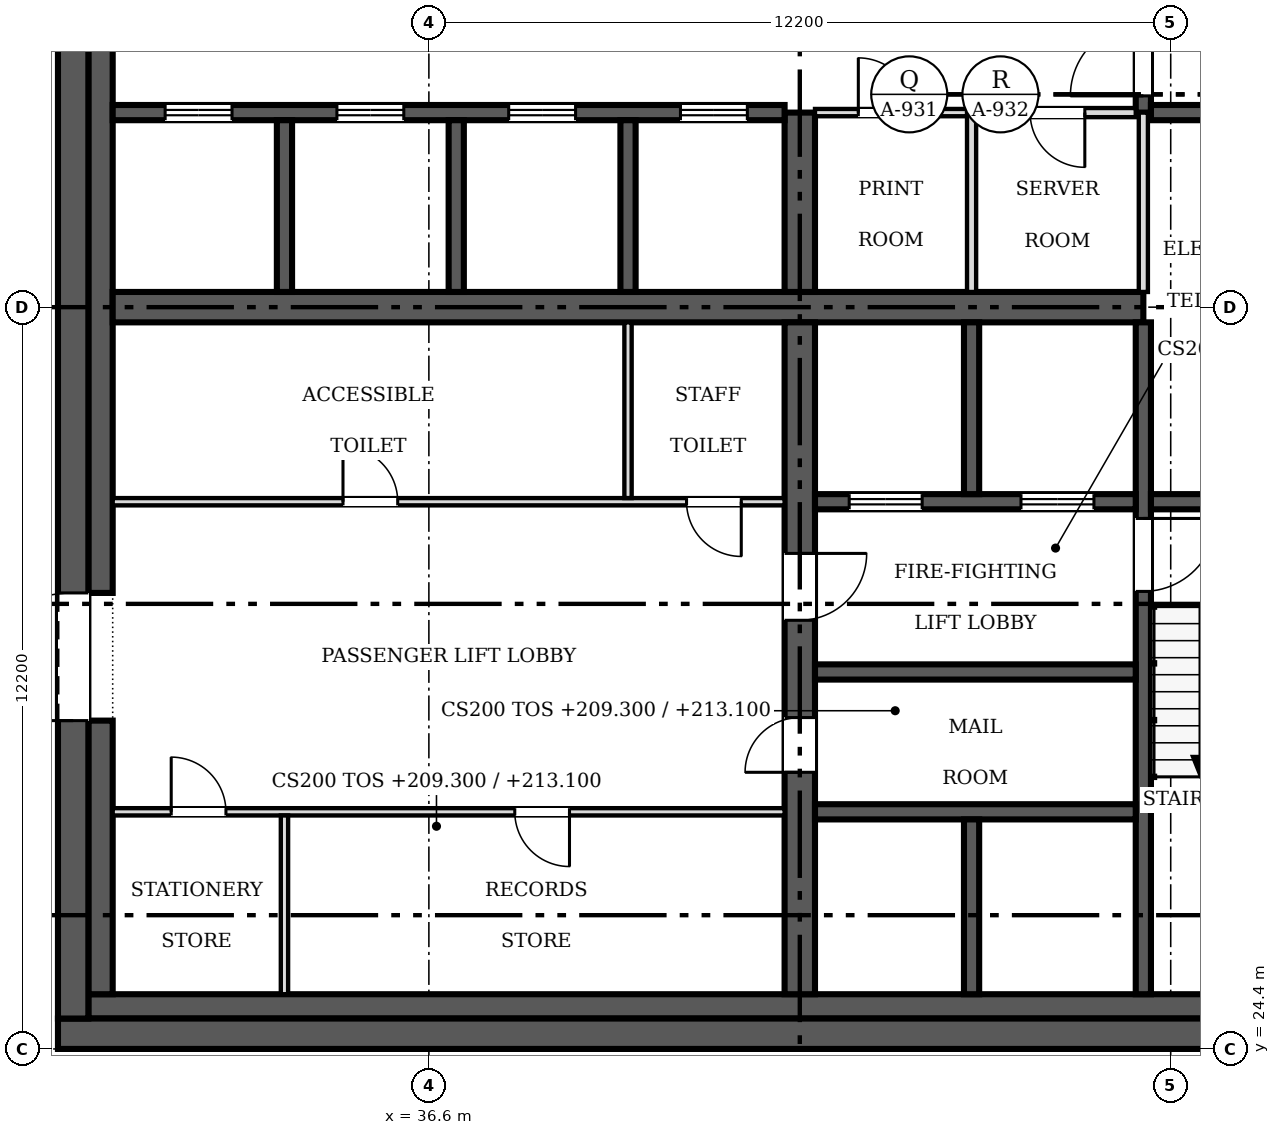
"""IFC4 building model, lengths in metres.
Left out: names, types, materials, properties, quantities, classifications, styles, units other than length and angle.
Written with IfcOpenShell. Run it as: python <this file> out.ifc"""

import sys

from ifc_helpers import new_model, si_unit, direction, frame, frame_2d, origin, place, context, subcontext, project, spatial, rectangle, extrude, source, transform, mapped, element, fill, save


model = new_model("IFC4")
c1 = context("Model", 3, precision=1e-05, world=origin(), true_north=direction((0.0, 1.0)))
c2 = subcontext(c1, "Body", "Model", "MODEL_VIEW")
j1 = project(units=[si_unit("LENGTHUNIT", "METRE"), si_unit("PLANEANGLEUNIT", "RADIAN")], contexts=[c1])
p1 = place(None, origin())
s1 = spatial("IfcSite", under=j1, at=p1, CompositionType="ELEMENT")
p2 = place(p1, origin())
s2 = spatial("IfcBuilding", under=s1, at=p2, CompositionType="ELEMENT")
p3 = place(p2, frame((0.0, 0.0, 209.3)))
s3 = spatial("IfcBuildingStorey", under=s2, at=p3, CompositionType="ELEMENT", Elevation=209.3)
p4 = place(p3, frame((54.9, 24.65, 0.0), z_axis=(0.0, 0.0, 1.0), x_axis=(-1.0, 0.0, 0.0)))
e1 = element("IfcWall", 1, at=p4, inside=s3, PredefinedType="SHEAR", context=c2, shape_type="SweptSolid", body=[
    extrude(rectangle(XDim=24.4, YDim=0.5, at=frame_2d((12.2, 0.0))), origin(), (0.0, 0.0, 1.0), 3.8),
])
m1 = source(origin(), c2, "Body", "SweptSolid", [
    extrude(rectangle(XDim=1.2, YDim=2.1, at=frame_2d((0.6, 1.05))), frame((0.0, 0.26, 0.0), z_axis=(0.0, -1.0, 0.0), x_axis=(1.0, 0.0, 0.0)), (0.0, 0.0, 1.0), 0.52),
])
p5 = place(p4, frame((1.5, 0.0, 0.0)))
e2 = element("IfcOpeningElement", 2, at=p5, cuts=e1, PredefinedType="OPENING", context=c2, shape_type="MappedRepresentation", body=[
    mapped(m1, transform((0.0, 0.0, 0.0), scale=1.0)),
])
p6 = place(p3, frame((30.75, 24.9, 0.0), z_axis=(0.0, 0.0, 1.0), x_axis=(0.0, 1.0, 0.0)))
e3 = element("IfcWall", 3, at=p6, inside=s3, PredefinedType="SHEAR", context=c2, shape_type="SweptSolid", body=[
    extrude(rectangle(XDim=23.4, YDim=0.5, at=frame_2d((11.7, 0.0))), origin(), (0.0, 0.0, 1.0), 3.8),
])
m2 = source(origin(), c2, "Body", "SweptSolid", [
    extrude(rectangle(XDim=2.1, YDim=2.4, at=frame_2d((1.05, 1.2))), frame((0.0, 0.26, 0.0), z_axis=(0.0, -1.0, 0.0), x_axis=(1.0, 0.0, 0.0)), (0.0, 0.0, 1.0), 0.52),
])
p7 = place(p6, frame((4.9, 0.0, 0.0)))
e4 = element("IfcOpeningElement", 4, at=p7, cuts=e3, PredefinedType="OPENING", context=c2, shape_type="MappedRepresentation", body=[
    mapped(m2, transform((0.0, 0.0, 0.0), scale=1.0)),
])
p8 = place(p6, frame((16.4, 0.0, 0.0)))
e5 = element("IfcOpeningElement", 5, at=p8, cuts=e3, PredefinedType="OPENING", context=c2, shape_type="MappedRepresentation", body=[
    mapped(m2, transform((0.0, 0.0, 0.0), scale=1.0)),
])
p9 = place(p3, frame((31.0, 25.1, 0.0), z_axis=(0.0, 0.0, 1.0), x_axis=(1.0, 0.0, 0.0)))
e6 = element("IfcWall", 6, at=p9, inside=s3, PredefinedType="SOLIDWALL", context=c2, shape_type="SweptSolid", body=[
    extrude(rectangle(XDim=21.2, YDim=0.4, at=frame_2d((10.6, 0.0))), origin(), (0.0, 0.0, 1.0), 3.8),
])
p10 = place(p3, frame((31.2, 25.3, 0.0), z_axis=(0.0, 0.0, 1.0), x_axis=(0.0, 1.0, 0.0)))
e7 = element("IfcWall", 7, at=p10, inside=s3, PredefinedType="SOLIDWALL", context=c2, shape_type="SweptSolid", body=[
    extrude(rectangle(XDim=4.5, YDim=0.4, at=frame_2d((2.25, 0.0))), origin(), (0.0, 0.0, 1.0), 3.8),
])
p11 = place(p3, frame((31.2, 31.9, 0.0), z_axis=(0.0, 0.0, 1.0), x_axis=(0.0, 1.0, 0.0)))
e8 = element("IfcWall", 8, at=p11, inside=s3, PredefinedType="SOLIDWALL", context=c2, shape_type="SweptSolid", body=[
    extrude(rectangle(XDim=9.4, YDim=0.4, at=frame_2d((4.7, 0.0))), origin(), (0.0, 0.0, 1.0), 3.8),
])
p12 = place(p3, frame((31.4, 36.6, 0.0), z_axis=(0.0, 0.0, 1.0), x_axis=(1.0, 0.0, 0.0)))
e9 = element("IfcWall", 9, at=p12, inside=s3, PredefinedType="SHEAR", context=c2, shape_type="SweptSolid", body=[
    extrude(rectangle(XDim=16.95, YDim=0.5, at=frame_2d((8.475, 0.0))), origin(), (0.0, 0.0, 1.0), 3.8),
])
p13 = place(p3, frame((42.7, 36.35, 0.0), z_axis=(0.0, 0.0, 1.0), x_axis=(0.0, -1.0, 0.0)))
e10 = element("IfcWall", 10, at=p13, inside=s3, PredefinedType="SHEAR", context=c2, shape_type="SweptSolid", body=[
    extrude(rectangle(XDim=11.05, YDim=0.5, at=frame_2d((5.525, 0.0))), origin(), (0.0, 0.0, 1.0), 3.8),
])
m3 = source(origin(), c2, "Body", "SweptSolid", [
    extrude(rectangle(XDim=0.9, YDim=2.1, at=frame_2d((0.45, 1.05))), frame((0.0, 0.26, 0.0), z_axis=(0.0, -1.0, 0.0), x_axis=(1.0, 0.0, 0.0)), (0.0, 0.0, 1.0), 0.52),
])
p14 = place(p13, frame((6.5, 0.0, 0.0)))
e11 = element("IfcOpeningElement", 11, at=p14, cuts=e10, PredefinedType="OPENING", context=c2, shape_type="MappedRepresentation", body=[
    mapped(m3, transform((0.0, 0.0, 0.0), scale=1.0)),
])
m4 = source(origin(), c2, "Body", "SweptSolid", [
    extrude(rectangle(XDim=1.1, YDim=2.1, at=frame_2d((0.55, 1.05))), frame((0.0, 0.26, 0.0), z_axis=(0.0, -1.0, 0.0), x_axis=(1.0, 0.0, 0.0)), (0.0, 0.0, 1.0), 0.52),
])
p15 = place(p13, frame((3.8, 0.0, 0.0)))
e12 = element("IfcOpeningElement", 12, at=p15, cuts=e10, PredefinedType="OPENING", context=c2, shape_type="MappedRepresentation", body=[
    mapped(m4, transform((0.0, 0.0, 0.0), scale=1.0)),
])
p16 = place(p3, frame((42.7, 36.85, 0.0), z_axis=(0.0, 0.0, 1.0), x_axis=(0.0, 1.0, 0.0)))
e13 = element("IfcWall", 13, at=p16, inside=s3, PredefinedType="SHEAR", context=c2, shape_type="SweptSolid", body=[
    extrude(rectangle(XDim=2.95, YDim=0.5, at=frame_2d((1.475, 0.0))), origin(), (0.0, 0.0, 1.0), 3.8),
])
p17 = place(p3, frame((31.4, 39.8, 0.0), z_axis=(0.0, 0.0, 1.0), x_axis=(1.0, 0.0, 0.0)))
e14 = element("IfcWall", 14, at=p17, inside=s3, PredefinedType="SOLIDWALL", context=c2, shape_type="SweptSolid", body=[
    extrude(rectangle(XDim=11.05, YDim=0.25, at=frame_2d((5.525, 0.0))), origin(), (0.0, 0.0, 1.0), 3.8),
])
m5 = source(origin(), c2, "Body", "SweptSolid", [
    extrude(rectangle(XDim=1.1, YDim=2.1, at=frame_2d((0.55, 1.05))), frame((0.0, 0.135, 0.0), z_axis=(0.0, -1.0, 0.0), x_axis=(1.0, 0.0, 0.0)), (0.0, 0.0, 1.0), 0.27),
])
p18 = place(p17, frame((0.863, 0.0, 0.0)))
e15 = element("IfcOpeningElement", 15, at=p18, cuts=e14, PredefinedType="OPENING", context=c2, shape_type="MappedRepresentation", body=[
    mapped(m5, transform((0.0, 0.0, 0.0), scale=1.0)),
])
p19 = place(p17, frame((3.688, 0.0, 0.0)))
e16 = element("IfcOpeningElement", 16, at=p19, cuts=e14, PredefinedType="OPENING", context=c2, shape_type="MappedRepresentation", body=[
    mapped(m5, transform((0.0, 0.0, 0.0), scale=1.0)),
])
p20 = place(p17, frame((6.512, 0.0, 0.0)))
e17 = element("IfcOpeningElement", 17, at=p20, cuts=e14, PredefinedType="OPENING", context=c2, shape_type="MappedRepresentation", body=[
    mapped(m5, transform((0.0, 0.0, 0.0), scale=1.0)),
])
p21 = place(p17, frame((9.337, 0.0, 0.0)))
e18 = element("IfcOpeningElement", 18, at=p21, cuts=e14, PredefinedType="OPENING", context=c2, shape_type="MappedRepresentation", body=[
    mapped(m5, transform((0.0, 0.0, 0.0), scale=1.0)),
])
p22 = place(p3, frame((48.35, 36.35, 0.0), z_axis=(0.0, 0.0, 1.0), x_axis=(0.0, -1.0, 0.0)))
e19 = element("IfcWall", 19, at=p22, inside=s3, PredefinedType="SOLIDWALL", context=c2, shape_type="SweptSolid", body=[
    extrude(rectangle(XDim=11.05, YDim=0.25, at=frame_2d((5.525, 0.0))), origin(), (0.0, 0.0, 1.0), 3.8),
])
m6 = source(origin(), c2, "Body", "SweptSolid", [
    extrude(rectangle(XDim=1.2, YDim=2.1, at=frame_2d((0.6, 1.05))), frame((0.0, 0.135, 0.0), z_axis=(0.0, -1.0, 0.0), x_axis=(1.0, 0.0, 0.0)), (0.0, 0.0, 1.0), 0.27),
])
p23 = place(p22, frame((3.225, 0.0, 0.0)))
e20 = element("IfcOpeningElement", 20, at=p23, cuts=e19, PredefinedType="OPENING", context=c2, shape_type="MappedRepresentation", body=[
    mapped(m6, transform((0.0, 0.0, 0.0), scale=1.0)),
])
p24 = place(p3, frame((48.225, 33.4, 0.0), z_axis=(0.0, 0.0, 1.0), x_axis=(-1.0, 0.0, 0.0)))
e21 = element("IfcWall", 21, at=p24, inside=s3, PredefinedType="SOLIDWALL", context=c2, shape_type="SweptSolid", body=[
    extrude(rectangle(XDim=5.275, YDim=0.25, at=frame_2d((2.638, 0.0))), origin(), (0.0, 0.0, 1.0), 3.8),
])
p25 = place(p24, frame((3.512, 0.0, 0.0)))
e22 = element("IfcOpeningElement", 22, at=p25, cuts=e21, PredefinedType="OPENING", context=c2, shape_type="MappedRepresentation", body=[
    mapped(m6, transform((0.0, 0.0, 0.0), scale=1.0)),
])
p26 = place(p24, frame((0.688, 0.0, 0.0)))
e23 = element("IfcOpeningElement", 23, at=p26, cuts=e21, PredefinedType="OPENING", context=c2, shape_type="MappedRepresentation", body=[
    mapped(m6, transform((0.0, 0.0, 0.0), scale=1.0)),
])
p27 = place(p3, frame((48.475, 33.4, 0.0), z_axis=(0.0, 0.0, 1.0), x_axis=(1.0, 0.0, 0.0)))
e24 = element("IfcWall", 24, at=p27, inside=s3, PredefinedType="SOLIDWALL", context=c2, shape_type="SweptSolid", body=[
    extrude(rectangle(XDim=3.525, YDim=0.25, at=frame_2d((1.762, 0.0))), origin(), (0.0, 0.0, 1.0), 3.8),
])
p28 = place(p3, frame((48.35, 47.9, 0.0), z_axis=(0.0, 0.0, 1.0), x_axis=(0.0, -1.0, 0.0)))
e25 = element("IfcWall", 25, at=p28, inside=s3, PredefinedType="SOLIDWALL", context=c2, shape_type="SweptSolid", body=[
    extrude(rectangle(XDim=8.1, YDim=0.25, at=frame_2d((4.05, 0.0))), origin(), (0.0, 0.0, 1.0), 3.8),
])
p29 = place(p28, frame((6.625, 0.0, 0.0)))
e26 = element("IfcOpeningElement", 26, at=p29, cuts=e25, PredefinedType="OPENING", context=c2, shape_type="MappedRepresentation", body=[
    mapped(m6, transform((0.0, 0.0, 0.0), scale=1.0)),
])
for number, where, z_axis, x_axis in (
    (27, (42.95, 28.3, 0.0), (0.0, 0.0, 1.0), (1.0, 0.0, 0.0)),
    (28, (42.95, 30.6, 0.0), (0.0, 0.0, 1.0), (1.0, 0.0, 0.0)),
):
    element("IfcWall", number, at=place(p3, frame(where, z_axis=z_axis, x_axis=x_axis)), inside=s3, PredefinedType="SOLIDWALL", context=c2, shape_type="SweptSolid", body=[
        extrude(rectangle(XDim=5.275, YDim=0.25, at=frame_2d((2.638, 0.0))), origin(), (0.0, 0.0, 1.0), 3.8),
    ])
p30 = place(p3, frame((48.475, 39.8, 0.0), z_axis=(0.0, 0.0, 1.0), x_axis=(1.0, 0.0, 0.0)))
e29 = element("IfcWall", 29, at=p30, inside=s3, PredefinedType="SOLIDWALL", context=c2, shape_type="SweptSolid", body=[
    extrude(rectangle(XDim=3.4, YDim=0.25, at=frame_2d((1.7, 0.0))), origin(), (0.0, 0.0, 1.0), 3.8),
])
for number, where, z_axis, x_axis in (
    (30, (34.225, 36.85, 0.0), (0.0, 0.0, 1.0), (0.0, 1.0, 0.0)),
    (31, (37.05, 36.85, 0.0), (0.0, 0.0, 1.0), (0.0, 1.0, 0.0)),
    (32, (39.875, 36.85, 0.0), (0.0, 0.0, 1.0), (0.0, 1.0, 0.0)),
):
    element("IfcWall", number, at=place(p3, frame(where, z_axis=z_axis, x_axis=x_axis)), inside=s3, PredefinedType="SOLIDWALL", context=c2, shape_type="SweptSolid", body=[
        extrude(rectangle(XDim=2.825, YDim=0.25, at=frame_2d((1.413, 0.0))), origin(), (0.0, 0.0, 1.0), 3.8),
    ])
p31 = place(p3, frame((45.525, 33.525, 0.0), z_axis=(0.0, 0.0, 1.0), x_axis=(0.0, 1.0, 0.0)))
e33 = element("IfcWall", 33, at=p31, inside=s3, PredefinedType="SOLIDWALL", context=c2, shape_type="SweptSolid", body=[
    extrude(rectangle(XDim=2.825, YDim=0.25, at=frame_2d((1.413, 0.0))), origin(), (0.0, 0.0, 1.0), 3.8),
])
p32 = place(p3, frame((45.525, 25.3, 0.0), z_axis=(0.0, 0.0, 1.0), x_axis=(0.0, 1.0, 0.0)))
e34 = element("IfcWall", 34, at=p32, inside=s3, PredefinedType="SOLIDWALL", context=c2, shape_type="SweptSolid", body=[
    extrude(rectangle(XDim=2.875, YDim=0.25, at=frame_2d((1.438, 0.0))), origin(), (0.0, 0.0, 1.0), 3.8),
])
p33 = place(p3, frame((42.45, 28.3, 0.0), z_axis=(0.0, 0.0, 1.0), x_axis=(-1.0, 0.0, 0.0)))
e35 = element("IfcWall", 35, at=p33, inside=s3, PredefinedType="PARTITIONING", context=c2, shape_type="SweptSolid", body=[
    extrude(rectangle(XDim=11.05, YDim=0.12, at=frame_2d((5.525, 0.0))), origin(), (0.0, 0.0, 1.0), 3.6),
])
m7 = source(origin(), c2, "Body", "SweptSolid", [
    extrude(rectangle(XDim=0.9, YDim=2.1, at=frame_2d((0.45, 1.05))), frame((0.0, 0.07, 0.0), z_axis=(0.0, -1.0, 0.0), x_axis=(1.0, 0.0, 0.0)), (0.0, 0.0, 1.0), 0.14),
])
p34 = place(p33, frame((9.188, 0.0, 0.0)))
e36 = element("IfcOpeningElement", 36, at=p34, cuts=e35, PredefinedType="OPENING", context=c2, shape_type="MappedRepresentation", body=[
    mapped(m7, transform((0.0, 0.0, 0.0), scale=1.0)),
])
p35 = place(p33, frame((3.538, 0.0, 0.0)))
e37 = element("IfcOpeningElement", 37, at=p35, cuts=e35, PredefinedType="OPENING", context=c2, shape_type="MappedRepresentation", body=[
    mapped(m7, transform((0.0, 0.0, 0.0), scale=1.0)),
])
p36 = place(p3, frame((31.4, 33.4, 0.0), z_axis=(0.0, 0.0, 1.0), x_axis=(1.0, 0.0, 0.0)))
e38 = element("IfcWall", 38, at=p36, inside=s3, PredefinedType="PARTITIONING", context=c2, shape_type="SweptSolid", body=[
    extrude(rectangle(XDim=11.05, YDim=0.12, at=frame_2d((5.525, 0.0))), origin(), (0.0, 0.0, 1.0), 3.6),
])
p37 = place(p36, frame((3.788, 0.0, 0.0)))
e39 = element("IfcOpeningElement", 39, at=p37, cuts=e38, PredefinedType="OPENING", context=c2, shape_type="MappedRepresentation", body=[
    mapped(m7, transform((0.0, 0.0, 0.0), scale=1.0)),
])
p38 = place(p36, frame((9.438, 0.0, 0.0)))
e40 = element("IfcOpeningElement", 40, at=p38, cuts=e38, PredefinedType="OPENING", context=c2, shape_type="MappedRepresentation", body=[
    mapped(m7, transform((0.0, 0.0, 0.0), scale=1.0)),
])
for number, where, z_axis, x_axis in (
    (41, (45.525, 36.85, 0.0), (0.0, 0.0, 1.0), (0.0, 1.0, 0.0)),
    (42, (48.35, 36.85, 0.0), (0.0, 0.0, 1.0), (0.0, 1.0, 0.0)),
):
    element("IfcWall", number, at=place(p3, frame(where, z_axis=z_axis, x_axis=x_axis)), inside=s3, PredefinedType="PARTITIONING", context=c2, shape_type="SweptSolid", body=[
        extrude(rectangle(XDim=2.95, YDim=0.15, at=frame_2d((1.475, 0.0))), origin(), (0.0, 0.0, 1.0), 3.6),
    ])
p39 = place(p3, frame((39.875, 33.46, 0.0), z_axis=(0.0, 0.0, 1.0), x_axis=(0.0, 1.0, 0.0)))
e43 = element("IfcWall", 43, at=p39, inside=s3, PredefinedType="PARTITIONING", context=c2, shape_type="SweptSolid", body=[
    extrude(rectangle(XDim=2.89, YDim=0.12, at=frame_2d((1.445, 0.0))), origin(), (0.0, 0.0, 1.0), 3.6),
])
p40 = place(p3, frame((34.225, 25.3, 0.0), z_axis=(0.0, 0.0, 1.0), x_axis=(0.0, 1.0, 0.0)))
e44 = element("IfcWall", 44, at=p40, inside=s3, PredefinedType="PARTITIONING", context=c2, shape_type="SweptSolid", body=[
    extrude(rectangle(XDim=2.94, YDim=0.12, at=frame_2d((1.47, 0.0))), origin(), (0.0, 0.0, 1.0), 3.6),
])
p41 = place(p3, frame((45.45, 39.8, 0.0), z_axis=(0.0, 0.0, 1.0), x_axis=(-1.0, 0.0, 0.0)))
e45 = element("IfcWall", 45, at=p41, inside=s3, PredefinedType="PARTITIONING", context=c2, shape_type="SweptSolid", body=[
    extrude(rectangle(XDim=2.5, YDim=0.12, at=frame_2d((1.25, 0.0))), origin(), (0.0, 0.0, 1.0), 3.6),
])
p42 = place(p41, frame((0.887, 0.0, 0.0)))
e46 = element("IfcOpeningElement", 46, at=p42, cuts=e45, PredefinedType="OPENING", context=c2, shape_type="MappedRepresentation", body=[
    mapped(m7, transform((0.0, 0.0, 0.0), scale=1.0)),
])
p43 = place(p3, frame((48.225, 39.8, 0.0), z_axis=(0.0, 0.0, 1.0), x_axis=(-1.0, 0.0, 0.0)))
e47 = element("IfcWall", 47, at=p43, inside=s3, PredefinedType="PARTITIONING", context=c2, shape_type="SweptSolid", body=[
    extrude(rectangle(XDim=2.625, YDim=0.15, at=frame_2d((1.312, 0.0))), origin(), (0.0, 0.0, 1.0), 3.6),
])
m8 = source(origin(), c2, "Body", "SweptSolid", [
    extrude(rectangle(XDim=0.9, YDim=2.1, at=frame_2d((0.45, 1.05))), frame((0.0, 0.085, 0.0), z_axis=(0.0, -1.0, 0.0), x_axis=(1.0, 0.0, 0.0)), (0.0, 0.0, 1.0), 0.17),
])
p44 = place(p43, frame((0.837, 0.0, 0.0)))
e48 = element("IfcOpeningElement", 48, at=p44, cuts=e47, PredefinedType="OPENING", context=c2, shape_type="MappedRepresentation", body=[
    mapped(m8, transform((0.0, 0.0, 0.0), scale=1.0)),
])
m9 = source(origin(), c2, "Body", "SweptSolid", [
    extrude(rectangle(XDim=2.1, YDim=2.4, at=frame_2d((1.05, 1.2))), frame((0.0, 0.025, 0.0), z_axis=(0.0, -1.0, 0.0), x_axis=(1.0, 0.0, 0.0)), (0.0, 0.0, 1.0), 0.05),
])
p45 = place(p7, origin())
e49 = element("IfcDoor", 49, at=p45, inside=s3, OperationType="DOUBLE_DOOR_SINGLE_SWING", PredefinedType="DOOR", context=c2, shape_type="MappedRepresentation", body=[
    mapped(m9, transform((0.0, 0.0, 0.0), scale=1.0)),
])
fill(e4, e49)
m10 = source(origin(), c2, "Body", "SweptSolid", [
    extrude(rectangle(XDim=0.9, YDim=2.1, at=frame_2d((0.45, 1.05))), frame((0.0, 0.025, 0.0), z_axis=(0.0, -1.0, 0.0), x_axis=(1.0, 0.0, 0.0)), (0.0, 0.0, 1.0), 0.05),
])
p46 = place(p14, origin())
e50 = element("IfcDoor", 50, at=p46, inside=s3, OperationType="SINGLE_SWING_RIGHT", PredefinedType="DOOR", context=c2, shape_type="MappedRepresentation", body=[
    mapped(m10, transform((0.0, 0.0, 0.0), scale=1.0)),
])
fill(e11, e50)
m11 = source(origin(), c2, "Body", "SweptSolid", [
    extrude(rectangle(XDim=1.1, YDim=2.1, at=frame_2d((0.55, 1.05))), frame((0.0, 0.025, 0.0), z_axis=(0.0, -1.0, 0.0), x_axis=(1.0, 0.0, 0.0)), (0.0, 0.0, 1.0), 0.05),
])
p47 = place(p15, origin())
e51 = element("IfcDoor", 51, at=p47, inside=s3, OperationType="SINGLE_SWING_LEFT", PredefinedType="DOOR", context=c2, shape_type="MappedRepresentation", body=[
    mapped(m11, transform((0.0, 0.0, 0.0), scale=1.0)),
])
fill(e12, e51)
p48 = place(p18, origin())
e52 = element("IfcDoor", 52, at=p48, inside=s3, OperationType="DOUBLE_DOOR_SLIDING", PredefinedType="DOOR", context=c2, shape_type="MappedRepresentation", body=[
    mapped(m11, transform((0.0, 0.0, 0.0), scale=1.0)),
])
fill(e15, e52)
p49 = place(p19, origin())
e53 = element("IfcDoor", 53, at=p49, inside=s3, OperationType="DOUBLE_DOOR_SLIDING", PredefinedType="DOOR", context=c2, shape_type="MappedRepresentation", body=[
    mapped(m11, transform((0.0, 0.0, 0.0), scale=1.0)),
])
fill(e16, e53)
p50 = place(p20, origin())
e54 = element("IfcDoor", 54, at=p50, inside=s3, OperationType="DOUBLE_DOOR_SLIDING", PredefinedType="DOOR", context=c2, shape_type="MappedRepresentation", body=[
    mapped(m11, transform((0.0, 0.0, 0.0), scale=1.0)),
])
fill(e17, e54)
p51 = place(p21, origin())
e55 = element("IfcDoor", 55, at=p51, inside=s3, OperationType="DOUBLE_DOOR_SLIDING", PredefinedType="DOOR", context=c2, shape_type="MappedRepresentation", body=[
    mapped(m11, transform((0.0, 0.0, 0.0), scale=1.0)),
])
fill(e18, e55)
m12 = source(origin(), c2, "Body", "SweptSolid", [
    extrude(rectangle(XDim=1.2, YDim=2.1, at=frame_2d((0.6, 1.05))), frame((0.0, 0.025, 0.0), z_axis=(0.0, -1.0, 0.0), x_axis=(1.0, 0.0, 0.0)), (0.0, 0.0, 1.0), 0.05),
])
p52 = place(p23, origin())
e56 = element("IfcDoor", 56, at=p52, inside=s3, OperationType="SINGLE_SWING_LEFT", PredefinedType="DOOR", context=c2, shape_type="MappedRepresentation", body=[
    mapped(m12, transform((0.0, 0.0, 0.0), scale=1.0)),
])
fill(e20, e56)
p53 = place(p25, origin())
e57 = element("IfcDoor", 57, at=p53, inside=s3, OperationType="DOUBLE_DOOR_SLIDING", PredefinedType="DOOR", context=c2, shape_type="MappedRepresentation", body=[
    mapped(m12, transform((0.0, 0.0, 0.0), scale=1.0)),
])
fill(e22, e57)
p54 = place(p26, origin())
e58 = element("IfcDoor", 58, at=p54, inside=s3, OperationType="DOUBLE_DOOR_SLIDING", PredefinedType="DOOR", context=c2, shape_type="MappedRepresentation", body=[
    mapped(m12, transform((0.0, 0.0, 0.0), scale=1.0)),
])
fill(e23, e58)
p55 = place(p29, origin())
e59 = element("IfcDoor", 59, at=p55, inside=s3, OperationType="SINGLE_SWING_RIGHT", PredefinedType="DOOR", context=c2, shape_type="MappedRepresentation", body=[
    mapped(m12, transform((0.0, 0.0, 0.0), scale=1.0)),
])
fill(e26, e59)
p56 = place(p34, origin())
e60 = element("IfcDoor", 60, at=p56, inside=s3, OperationType="SINGLE_SWING_RIGHT", PredefinedType="DOOR", context=c2, shape_type="MappedRepresentation", body=[
    mapped(m10, transform((0.0, 0.0, 0.0), scale=1.0)),
])
fill(e36, e60)
p57 = place(p35, origin())
e61 = element("IfcDoor", 61, at=p57, inside=s3, OperationType="SINGLE_SWING_LEFT", PredefinedType="DOOR", context=c2, shape_type="MappedRepresentation", body=[
    mapped(m10, transform((0.0, 0.0, 0.0), scale=1.0)),
])
fill(e37, e61)
p58 = place(p37, origin())
e62 = element("IfcDoor", 62, at=p58, inside=s3, OperationType="SINGLE_SWING_LEFT", PredefinedType="DOOR", context=c2, shape_type="MappedRepresentation", body=[
    mapped(m10, transform((0.0, 0.0, 0.0), scale=1.0)),
])
fill(e39, e62)
p59 = place(p38, origin())
e63 = element("IfcDoor", 63, at=p59, inside=s3, OperationType="SINGLE_SWING_RIGHT", PredefinedType="DOOR", context=c2, shape_type="MappedRepresentation", body=[
    mapped(m10, transform((0.0, 0.0, 0.0), scale=1.0)),
])
fill(e40, e63)
p60 = place(p42, origin())
e64 = element("IfcDoor", 64, at=p60, inside=s3, OperationType="SINGLE_SWING_RIGHT", PredefinedType="DOOR", context=c2, shape_type="MappedRepresentation", body=[
    mapped(m10, transform((0.0, 0.0, 0.0), scale=1.0)),
])
fill(e46, e64)
p61 = place(p44, origin())
e65 = element("IfcDoor", 65, at=p61, inside=s3, OperationType="SINGLE_SWING_LEFT", PredefinedType="DOOR", context=c2, shape_type="MappedRepresentation", body=[
    mapped(m10, transform((0.0, 0.0, 0.0), scale=1.0)),
])
fill(e48, e65)
save(model, sys.argv[1])
